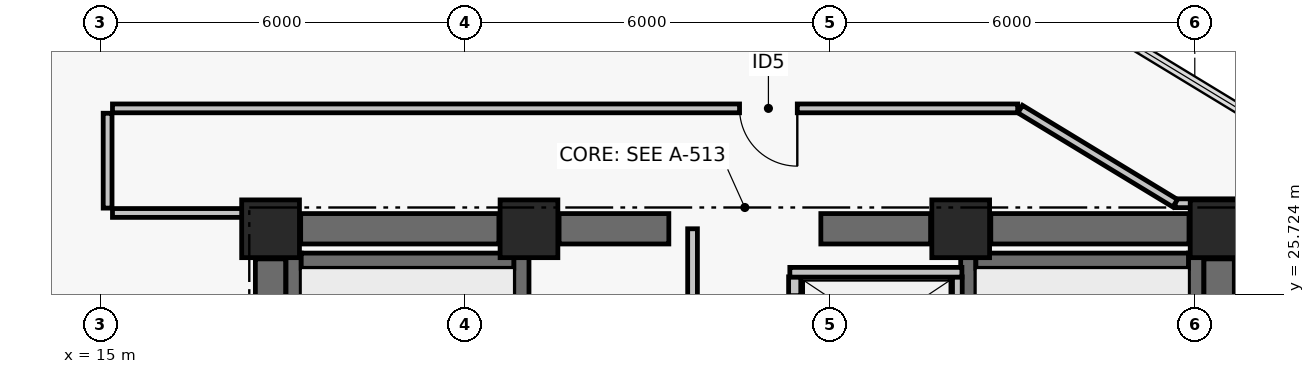
"""IFC4 building model, lengths in metres.
Left out: names, types, materials, properties, quantities, classifications, styles, units other than length and angle.
Written with IfcOpenShell. Run it as: python <this file> out.ifc"""

import sys

from ifc_helpers import new_model, si_unit, direction, frame, frame_2d, origin, origin_2d, place, context, subcontext, project, spatial, rectangle, extrude, element, fill, save


model = new_model("IFC4")
c1 = context("Model", 3, precision=1e-05, world=origin(), true_north=direction((0.0, 1.0)))
c2 = subcontext(c1, "Body", "Model", "MODEL_VIEW")
j1 = project(units=[si_unit("LENGTHUNIT", "METRE"), si_unit("PLANEANGLEUNIT", "RADIAN")], contexts=[c1])
p1 = place(None, origin())
s1 = spatial("IfcSite", under=j1, at=p1, CompositionType="ELEMENT")
p2 = place(p1, origin())
s2 = spatial("IfcBuilding", under=s1, at=p2, CompositionType="ELEMENT")
p3 = place(p2, frame((0.0, 0.0, 184.08)))
s3 = spatial("IfcBuildingStorey", under=s2, at=p3, CompositionType="ELEMENT", Elevation=184.08)
for number, where, z_axis, x_axis in (
    (1, (17.8, 26.8, 0.0), (0.0, 0.0, 1.0), (1.0, 0.0, 0.0)),
    (2, (22.05, 26.8, 0.0), (0.0, 0.0, 1.0), (1.0, 0.0, 0.0)),
    (3, (29.15, 26.8, 0.0), (0.0, 0.0, 1.0), (1.0, 0.0, 0.0)),
    (4, (33.4, 26.8, 0.0), (0.0, 0.0, 1.0), (1.0, 0.0, 0.0)),
):
    element("IfcColumn", number, at=place(p3, frame(where, z_axis=z_axis, x_axis=x_axis)), inside=s3, PredefinedType="COLUMN", context=c2, shape_type="SweptSolid", body=[
        extrude(rectangle(XDim=0.95, YDim=0.95, at=origin_2d()), origin(), (0.0, 0.0, 1.0), 3.72),
    ])
p4 = place(p3, frame((18.295, 26.8, 0.0), z_axis=(0.0, 0.0, 1.0), x_axis=(1.0, 0.0, 0.0)))
e5 = element("IfcWall", 5, at=p4, inside=s3, PredefinedType="SHEAR", context=c2, shape_type="SweptSolid", body=[
    extrude(rectangle(XDim=3.26, YDim=0.5, at=frame_2d((1.63, 0.0))), origin(), (0.0, 0.0, 1.0), 3.5),
])
p5 = place(p3, frame((22.545, 26.8, 0.0), z_axis=(0.0, 0.0, 1.0), x_axis=(1.0, 0.0, 0.0)))
e6 = element("IfcWall", 6, at=p5, inside=s3, PredefinedType="SHEAR", context=c2, shape_type="SweptSolid", body=[
    extrude(rectangle(XDim=1.805, YDim=0.5, at=frame_2d((0.903, 0.0))), origin(), (0.0, 0.0, 1.0), 3.5),
])
p6 = place(p3, frame((26.85, 26.8, 0.0), z_axis=(0.0, 0.0, 1.0), x_axis=(1.0, 0.0, 0.0)))
e7 = element("IfcWall", 7, at=p6, inside=s3, PredefinedType="SHEAR", context=c2, shape_type="SweptSolid", body=[
    extrude(rectangle(XDim=1.805, YDim=0.5, at=frame_2d((0.902, 0.0))), origin(), (0.0, 0.0, 1.0), 3.5),
])
p7 = place(p3, frame((29.645, 26.8, 0.0), z_axis=(0.0, 0.0, 1.0), x_axis=(1.0, 0.0, 0.0)))
e8 = element("IfcWall", 8, at=p7, inside=s3, PredefinedType="SHEAR", context=c2, shape_type="SweptSolid", body=[
    extrude(rectangle(XDim=3.26, YDim=0.5, at=frame_2d((1.63, 0.0))), origin(), (0.0, 0.0, 1.0), 3.5),
])
for number, where, z_axis, x_axis in (
    (9, (17.8, 17.695, 0.0), (0.0, 0.0, 1.0), (0.0, 1.0, 0.0)),
    (10, (33.4, 17.695, 0.0), (0.0, 0.0, 1.0), (0.0, 1.0, 0.0)),
):
    element("IfcWall", number, at=place(p3, frame(where, z_axis=z_axis, x_axis=x_axis)), inside=s3, PredefinedType="SHEAR", context=c2, shape_type="SweptSolid", body=[
        extrude(rectangle(XDim=8.61, YDim=0.5, at=frame_2d((4.305, 0.0))), origin(), (0.0, 0.0, 1.0), 3.5),
    ])
p8 = place(p3, frame((18.179, 17.6, 0.0), z_axis=(0.0, 0.0, 1.0), x_axis=(0.0, 1.0, 0.0)))
e11 = element("IfcWall", 11, at=p8, inside=s3, PredefinedType="SHEAR", context=c2, shape_type="SweptSolid", body=[
    extrude(rectangle(XDim=8.8, YDim=0.25, at=frame_2d((4.4, 0.0))), origin(), (0.0, 0.0, 1.0), 3.5),
])
p9 = place(p3, frame((21.925, 17.6, 0.0), z_axis=(0.0, 0.0, 1.0), x_axis=(0.0, 1.0, 0.0)))
e12 = element("IfcWall", 12, at=p9, inside=s3, PredefinedType="SHEAR", context=c2, shape_type="SweptSolid", body=[
    extrude(rectangle(XDim=8.8, YDim=0.25, at=frame_2d((4.4, 0.0))), origin(), (0.0, 0.0, 1.0), 3.5),
])
p10 = place(p9, frame((0.35, 0.0, 0.0)))
e13 = element("IfcOpeningElement", 13, at=p10, cuts=e12, PredefinedType="OPENING", context=c2, shape_type="SweptSolid", body=[
    extrude(rectangle(XDim=1.05, YDim=2.08, at=frame_2d((0.525, 1.04))), frame((0.0, 0.135, 0.0), z_axis=(0.0, -1.0, 0.0), x_axis=(1.0, 0.0, 0.0)), (0.0, 0.0, 1.0), 0.27),
])
p11 = place(p3, frame((18.304, 26.275, 0.0), z_axis=(0.0, 0.0, 1.0), x_axis=(1.0, 0.0, 0.0)))
e14 = element("IfcWall", 14, at=p11, inside=s3, PredefinedType="SHEAR", context=c2, shape_type="SweptSolid", body=[
    extrude(rectangle(XDim=3.496, YDim=0.25, at=frame_2d((1.748, 0.0))), origin(), (0.0, 0.0, 1.0), 3.5),
])
p12 = place(p3, frame((29.275, 17.6, 0.0), z_axis=(0.0, 0.0, 1.0), x_axis=(0.0, 1.0, 0.0)))
e15 = element("IfcWall", 15, at=p12, inside=s3, PredefinedType="SHEAR", context=c2, shape_type="SweptSolid", body=[
    extrude(rectangle(XDim=8.8, YDim=0.25, at=frame_2d((4.4, 0.0))), origin(), (0.0, 0.0, 1.0), 3.5),
])
p13 = place(p12, frame((0.35, 0.0, 0.0)))
e16 = element("IfcOpeningElement", 16, at=p13, cuts=e15, PredefinedType="OPENING", context=c2, shape_type="SweptSolid", body=[
    extrude(rectangle(XDim=1.05, YDim=2.08, at=frame_2d((0.525, 1.04))), frame((0.0, 0.135, 0.0), z_axis=(0.0, -1.0, 0.0), x_axis=(1.0, 0.0, 0.0)), (0.0, 0.0, 1.0), 0.27),
])
p14 = place(p3, frame((33.021, 17.6, 0.0), z_axis=(0.0, 0.0, 1.0), x_axis=(0.0, 1.0, 0.0)))
e17 = element("IfcWall", 17, at=p14, inside=s3, PredefinedType="SHEAR", context=c2, shape_type="SweptSolid", body=[
    extrude(rectangle(XDim=8.8, YDim=0.25, at=frame_2d((4.4, 0.0))), origin(), (0.0, 0.0, 1.0), 3.5),
])
p15 = place(p3, frame((29.4, 26.275, 0.0), z_axis=(0.0, 0.0, 1.0), x_axis=(1.0, 0.0, 0.0)))
e18 = element("IfcWall", 18, at=p15, inside=s3, PredefinedType="SHEAR", context=c2, shape_type="SweptSolid", body=[
    extrude(rectangle(XDim=3.496, YDim=0.25, at=frame_2d((1.748, 0.0))), origin(), (0.0, 0.0, 1.0), 3.5),
])
p16 = place(p3, frame((26.42, 24.29, 0.0), z_axis=(0.0, 0.0, 1.0), x_axis=(0.0, 1.0, 0.0)))
e19 = element("IfcWall", 19, at=p16, inside=s3, PredefinedType="PARTITIONING", context=c2, shape_type="SweptSolid", body=[
    extrude(rectangle(XDim=1.72, YDim=0.2, at=frame_2d((0.86, 0.0))), origin(), (0.0, 0.0, 1.0), 3.5),
])
p17 = place(p16, frame((0.31, 0.0, 0.0)))
e20 = element("IfcOpeningElement", 20, at=p17, cuts=e19, PredefinedType="OPENING", context=c2, shape_type="SweptSolid", body=[
    extrude(rectangle(XDim=1.1, YDim=2.08, at=frame_2d((0.55, 1.04))), frame((0.0, 0.11, 0.0), z_axis=(0.0, -1.0, 0.0), x_axis=(1.0, 0.0, 0.0)), (0.0, 0.0, 1.0), 0.22),
])
p18 = place(p3, frame((29.095, 20.56, 0.0), z_axis=(0.0, 0.0, 1.0), x_axis=(0.0, 1.0, 0.0)))
e21 = element("IfcWall", 21, at=p18, inside=s3, PredefinedType="PARTITIONING", context=c2, shape_type="SweptSolid", body=[
    extrude(rectangle(XDim=5.45, YDim=0.16, at=frame_2d((2.725, 0.0))), origin(), (0.0, 0.0, 1.0), 3.5),
])
p19 = place(p3, frame((26.34, 26.085, 0.0), z_axis=(0.0, 0.0, 1.0), x_axis=(1.0, 0.0, 0.0)))
e22 = element("IfcWall", 22, at=p19, inside=s3, PredefinedType="PARTITIONING", context=c2, shape_type="SweptSolid", body=[
    extrude(rectangle(XDim=2.83, YDim=0.16, at=frame_2d((1.415, 0.0))), origin(), (0.0, 0.0, 1.0), 3.5),
])
p20 = place(p3, frame((24.74, 22.43, 0.0), z_axis=(0.0, 0.0, 1.0), x_axis=(0.0, 1.0, 0.0)))
e23 = element("IfcWall", 23, at=p20, inside=s3, PredefinedType="PARTITIONING", context=c2, shape_type="SweptSolid", body=[
    extrude(rectangle(XDim=4.37, YDim=0.16, at=frame_2d((2.185, 0.0))), origin(), (0.0, 0.0, 1.0), 2.63),
])
p21 = place(p20, frame((1.4, 0.0, 0.0)))
e24 = element("IfcOpeningElement", 24, at=p21, cuts=e23, PredefinedType="OPENING", context=c2, shape_type="SweptSolid", body=[
    extrude(rectangle(XDim=0.98, YDim=2.06, at=frame_2d((0.49, 1.03))), frame((0.0, 0.09, 0.0), z_axis=(0.0, -1.0, 0.0), x_axis=(1.0, 0.0, 0.0)), (0.0, 0.0, 1.0), 0.18),
])
p22 = place(p3, frame((33.74, 27.22, 0.0), z_axis=(0.0, 0.0, 1.0), x_axis=(-1.0, 0.0, 0.0)))
e25 = element("IfcWall", 25, at=p22, inside=s3, PredefinedType="PARTITIONING", context=c2, shape_type="SweptSolid", body=[
    extrude(rectangle(XDim=1.062, YDim=0.145, at=frame_2d((0.531, 0.0))), origin(), (0.0, 0.0, 1.0), 2.63),
])
p23 = place(p3, frame((32.677, 27.22, 0.0), z_axis=(0.0, 0.0, 1.0), x_axis=(-0.854662977584, 0.519183199601, 0.0)))
e26 = element("IfcWall", 26, at=p23, inside=s3, PredefinedType="PARTITIONING", context=c2, shape_type="SweptSolid", body=[
    extrude(rectangle(XDim=2.982, YDim=0.145, at=frame_2d((1.491, 0.0))), origin(), (0.0, 0.0, 1.0), 2.63),
])
p24 = place(p3, frame((30.087, 28.78, 0.0), z_axis=(0.0, 0.0, 1.0), x_axis=(-1.0, 0.0, 0.0)))
e27 = element("IfcWall", 27, at=p24, inside=s3, PredefinedType="PARTITIONING", context=c2, shape_type="SweptSolid", body=[
    extrude(rectangle(XDim=14.887, YDim=0.145, at=frame_2d((7.444, 0.0))), origin(), (0.0, 0.0, 1.0), 2.73),
])
p25 = place(p24, frame((3.624, 0.0, 0.0)))
e28 = element("IfcOpeningElement", 28, at=p25, cuts=e27, PredefinedType="OPENING", context=c2, shape_type="SweptSolid", body=[
    extrude(rectangle(XDim=0.95, YDim=2.06, at=frame_2d((0.475, 1.03))), frame((0.0, 0.083, 0.0), z_axis=(0.0, -1.0, 0.0), x_axis=(1.0, 0.0, 0.0)), (0.0, 0.0, 1.0), 0.165),
])
p26 = place(p3, frame((15.12, 28.7, 0.0), z_axis=(0.0, 0.0, 1.0), x_axis=(0.0, -1.0, 0.0)))
e29 = element("IfcWall", 29, at=p26, inside=s3, PredefinedType="PARTITIONING", context=c2, shape_type="SweptSolid", body=[
    extrude(rectangle(XDim=1.56, YDim=0.145, at=frame_2d((0.78, 0.0))), origin(), (0.0, 0.0, 1.0), 2.73),
])
p27 = place(p3, frame((15.2, 27.06, 0.0), z_axis=(0.0, 0.0, 1.0), x_axis=(1.0, 0.0, 0.0)))
e30 = element("IfcWall", 30, at=p27, inside=s3, PredefinedType="PARTITIONING", context=c2, shape_type="SweptSolid", body=[
    extrude(rectangle(XDim=2.18, YDim=0.145, at=frame_2d((1.09, 0.0))), origin(), (0.0, 0.0, 1.0), 2.73),
])
p28 = place(p25, origin())
e31 = element("IfcDoor", 31, at=p28, inside=s3, OperationType="SINGLE_SWING_LEFT", PredefinedType="DOOR", context=c2, shape_type="SweptSolid", body=[
    extrude(rectangle(XDim=0.95, YDim=2.06, at=frame_2d((0.475, 1.03))), frame((0.0, 0.025, 0.0), z_axis=(0.0, -1.0, 0.0), x_axis=(1.0, 0.0, 0.0)), (0.0, 0.0, 1.0), 0.05),
])
fill(e28, e31)
save(model, sys.argv[1])
